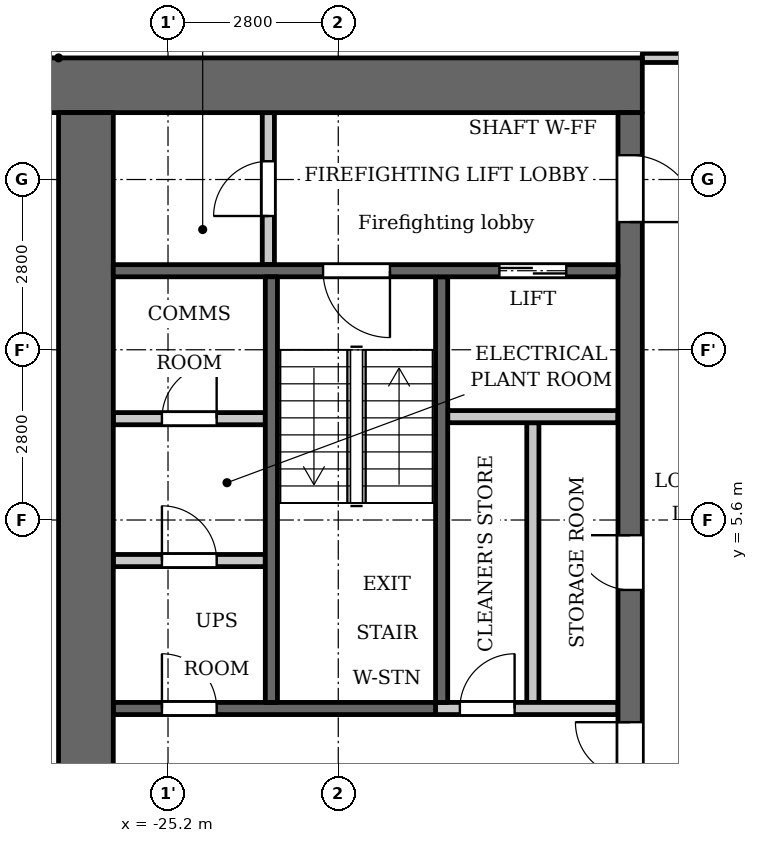
"""IFC4 building model, lengths in metres.
Left out: names, types, materials, properties, quantities, classifications, styles, units other than length and angle.
Written with IfcOpenShell. Run it as: python <this file> out.ifc"""

import sys

from ifc_helpers import new_model, si_unit, direction, frame, frame_2d, origin, place, context, subcontext, project, spatial, rectangle, extrude, element, fill, save


model = new_model("IFC4")
c1 = context("Model", 3, precision=1e-05, world=origin(), true_north=direction((0.0, 1.0)))
c2 = subcontext(c1, "Body", "Model", "MODEL_VIEW")
j1 = project(units=[si_unit("LENGTHUNIT", "METRE"), si_unit("PLANEANGLEUNIT", "RADIAN")], contexts=[c1])
p1 = place(None, origin())
s1 = spatial("IfcSite", under=j1, at=p1, CompositionType="ELEMENT")
p2 = place(p1, origin())
s2 = spatial("IfcBuilding", under=s1, at=p2, CompositionType="ELEMENT")
p3 = place(p2, frame((0.0, 0.0, 44.5)))
s3 = spatial("IfcBuildingStorey", under=s2, at=p3, CompositionType="ELEMENT", Elevation=44.5)
p4 = place(p3, frame((-20.7, 2.6, 0.0), z_axis=(0.0, 0.0, 1.0), x_axis=(0.0, 1.0, 0.0)))
e1 = element("IfcWall", 1, at=p4, inside=s3, PredefinedType="SHEAR", context=c2, shape_type="SweptSolid", body=[
    extrude(rectangle(XDim=7.0, YDim=0.2, at=frame_2d((3.5, 0.0))), origin(), (0.0, 0.0, 1.0), 3.2),
])
p5 = place(p3, frame((-20.8, 2.5, 0.0), z_axis=(0.0, 0.0, 1.0), x_axis=(-1.0, 0.0, 0.0)))
e2 = element("IfcWall", 2, at=p5, inside=s3, PredefinedType="SHEAR", context=c2, shape_type="SweptSolid", body=[
    extrude(rectangle(XDim=5.3, YDim=0.2, at=frame_2d((2.65, 0.0))), origin(), (0.0, 0.0, 1.0), 3.2),
])
p6 = place(p5, frame((3.6, 0.0, 0.0)))
e3 = element("IfcOpeningElement", 3, at=p6, cuts=e2, PredefinedType="OPENING", context=c2, shape_type="SweptSolid", body=[
    extrude(rectangle(XDim=0.9, YDim=2.1, at=frame_2d((0.45, 1.05))), frame((0.0, 0.11, 0.0), z_axis=(0.0, -1.0, 0.0), x_axis=(1.0, 0.0, 0.0)), (0.0, 0.0, 1.0), 0.22),
])
p7 = place(p3, frame((-17.4, 12.75, 0.0), z_axis=(0.0, 0.0, 1.0), x_axis=(-1.0, 0.0, 0.0)))
e4 = element("IfcWall", 4, at=p7, inside=s3, PredefinedType="SHEAR", context=c2, shape_type="SweptSolid", body=[
    extrude(rectangle(XDim=10.4, YDim=0.9, at=frame_2d((5.2, 0.0))), origin(), (0.0, 0.0, 1.0), 3.2),
])
p8 = place(p3, frame((-19.2, 2.6, 0.0), z_axis=(0.0, 0.0, 1.0), x_axis=(0.0, 1.0, 0.0)))
e5 = element("IfcWall", 5, at=p8, inside=s3, PredefinedType="PARTITIONING", context=c2, shape_type="SweptSolid", body=[
    extrude(rectangle(XDim=4.6, YDim=0.2, at=frame_2d((2.3, 0.0))), origin(), (0.0, 0.0, 1.0), 3.2),
])
p9 = place(p3, frame((-17.6, -12.3, 0.0), z_axis=(0.0, 0.0, 1.0), x_axis=(0.0, 1.0, 0.0)))
e6 = element("IfcWall", 6, at=p9, inside=s3, PredefinedType="SHEAR", context=c2, shape_type="SweptSolid", body=[
    extrude(rectangle(XDim=24.6, YDim=0.4, at=frame_2d((12.3, 0.0))), origin(), (0.0, 0.0, 1.0), 3.2),
])
p10 = place(p9, frame((6.0, 0.0, 0.0)))
e7 = element("IfcOpeningElement", 7, at=p10, cuts=e6, PredefinedType="OPENING", context=c2, shape_type="SweptSolid", body=[
    extrude(rectangle(XDim=1.1, YDim=2.1, at=frame_2d((0.55, 1.05))), frame((0.0, 0.21, 0.0), z_axis=(0.0, -1.0, 0.0), x_axis=(1.0, 0.0, 0.0)), (0.0, 0.0, 1.0), 0.42),
])
p11 = place(p9, frame((8.4, 0.0, 0.0)))
e8 = element("IfcOpeningElement", 8, at=p11, cuts=e6, PredefinedType="OPENING", context=c2, shape_type="SweptSolid", body=[
    extrude(rectangle(XDim=1.1, YDim=2.1, at=frame_2d((0.55, 1.05))), frame((0.0, 0.21, 0.0), z_axis=(0.0, -1.0, 0.0), x_axis=(1.0, 0.0, 0.0)), (0.0, 0.0, 1.0), 0.42),
])
p12 = place(p9, frame((10.8, 0.0, 0.0)))
e9 = element("IfcOpeningElement", 9, at=p12, cuts=e6, PredefinedType="OPENING", context=c2, shape_type="SweptSolid", body=[
    extrude(rectangle(XDim=1.1, YDim=2.1, at=frame_2d((0.55, 1.05))), frame((0.0, 0.21, 0.0), z_axis=(0.0, -1.0, 0.0), x_axis=(1.0, 0.0, 0.0)), (0.0, 0.0, 1.0), 0.42),
])
p13 = place(p9, frame((16.75, 0.0, 0.0)))
e10 = element("IfcOpeningElement", 10, at=p13, cuts=e6, PredefinedType="OPENING", context=c2, shape_type="SweptSolid", body=[
    extrude(rectangle(XDim=0.9, YDim=2.1, at=frame_2d((0.45, 1.05))), frame((0.0, 0.21, 0.0), z_axis=(0.0, -1.0, 0.0), x_axis=(1.0, 0.0, 0.0)), (0.0, 0.0, 1.0), 0.42),
])
p14 = place(p9, frame((22.8, 0.0, 0.0)))
e11 = element("IfcOpeningElement", 11, at=p14, cuts=e6, PredefinedType="OPENING", context=c2, shape_type="SweptSolid", body=[
    extrude(rectangle(XDim=1.1, YDim=2.1, at=frame_2d((0.55, 1.05))), frame((0.0, 0.21, 0.0), z_axis=(0.0, -1.0, 0.0), x_axis=(1.0, 0.0, 0.0)), (0.0, 0.0, 1.0), 0.42),
])
p15 = place(p9, frame((0.7, 0.0, 0.0)))
e12 = element("IfcOpeningElement", 12, at=p15, cuts=e6, PredefinedType="OPENING", context=c2, shape_type="SweptSolid", body=[
    extrude(rectangle(XDim=1.1, YDim=2.1, at=frame_2d((0.55, 1.05))), frame((0.0, 0.21, 0.0), z_axis=(0.0, -1.0, 0.0), x_axis=(1.0, 0.0, 0.0)), (0.0, 0.0, 1.0), 0.42),
])
p16 = place(p9, frame((12.775, 0.0, 0.0)))
e13 = element("IfcOpeningElement", 13, at=p16, cuts=e6, PredefinedType="OPENING", context=c2, shape_type="SweptSolid", body=[
    extrude(rectangle(XDim=1.8, YDim=2.1, at=frame_2d((0.9, 1.05))), frame((0.0, 0.21, 0.0), z_axis=(0.0, -1.0, 0.0), x_axis=(1.0, 0.0, 0.0)), (0.0, 0.0, 1.0), 0.42),
])
p17 = place(p3, frame((-26.55, -12.3, 0.0), z_axis=(0.0, 0.0, 1.0), x_axis=(0.0, 1.0, 0.0)))
e14 = element("IfcWall", 14, at=p17, inside=s3, PredefinedType="SHEAR", context=c2, shape_type="SweptSolid", body=[
    extrude(rectangle(XDim=24.6, YDim=0.9, at=frame_2d((12.3, 0.0))), origin(), (0.0, 0.0, 1.0), 3.2),
])
p18 = place(p3, frame((-23.55, 9.8, 0.0), z_axis=(0.0, 0.0, 1.0), x_axis=(0.0, 1.0, 0.0)))
e15 = element("IfcWall", 15, at=p18, inside=s3, PredefinedType="PARTITIONING", context=c2, shape_type="SweptSolid", body=[
    extrude(rectangle(XDim=2.5, YDim=0.2, at=frame_2d((1.25, 0.0))), origin(), (0.0, 0.0, 1.0), 3.2),
])
p19 = place(p18, frame((0.8, 0.0, 0.0)))
e16 = element("IfcOpeningElement", 16, at=p19, cuts=e15, PredefinedType="OPENING", context=c2, shape_type="SweptSolid", body=[
    extrude(rectangle(XDim=0.9, YDim=2.1, at=frame_2d((0.45, 1.05))), frame((0.0, 0.11, 0.0), z_axis=(0.0, -1.0, 0.0), x_axis=(1.0, 0.0, 0.0)), (0.0, 0.0, 1.0), 0.22),
])
p20 = place(p3, frame((-23.6, 4.933, 0.0), z_axis=(0.0, 0.0, 1.0), x_axis=(-1.0, 0.0, 0.0)))
e17 = element("IfcWall", 17, at=p20, inside=s3, PredefinedType="PARTITIONING", context=c2, shape_type="SweptSolid", body=[
    extrude(rectangle(XDim=2.5, YDim=0.2, at=frame_2d((1.25, 0.0))), origin(), (0.0, 0.0, 1.0), 3.2),
])
p21 = place(p20, frame((0.8, 0.0, 0.0)))
e18 = element("IfcOpeningElement", 18, at=p21, cuts=e17, PredefinedType="OPENING", context=c2, shape_type="SweptSolid", body=[
    extrude(rectangle(XDim=0.9, YDim=2.1, at=frame_2d((0.45, 1.05))), frame((0.0, 0.11, 0.0), z_axis=(0.0, -1.0, 0.0), x_axis=(1.0, 0.0, 0.0)), (0.0, 0.0, 1.0), 0.22),
])
p22 = place(p3, frame((-23.6, 7.267, 0.0), z_axis=(0.0, 0.0, 1.0), x_axis=(-1.0, 0.0, 0.0)))
e19 = element("IfcWall", 19, at=p22, inside=s3, PredefinedType="PARTITIONING", context=c2, shape_type="SweptSolid", body=[
    extrude(rectangle(XDim=2.5, YDim=0.2, at=frame_2d((1.25, 0.0))), origin(), (0.0, 0.0, 1.0), 3.2),
])
p23 = place(p22, frame((0.8, 0.0, 0.0)))
e20 = element("IfcOpeningElement", 20, at=p23, cuts=e19, PredefinedType="OPENING", context=c2, shape_type="SweptSolid", body=[
    extrude(rectangle(XDim=0.9, YDim=2.1, at=frame_2d((0.45, 1.05))), frame((0.0, 0.11, 0.0), z_axis=(0.0, -1.0, 0.0), x_axis=(1.0, 0.0, 0.0)), (0.0, 0.0, 1.0), 0.22),
])
p24 = place(p3, frame((-17.8, 2.5, 0.0), z_axis=(0.0, 0.0, 1.0), x_axis=(-1.0, 0.0, 0.0)))
e21 = element("IfcWall", 21, at=p24, inside=s3, PredefinedType="PARTITIONING", context=c2, shape_type="SweptSolid", body=[
    extrude(rectangle(XDim=3.0, YDim=0.2, at=frame_2d((1.5, 0.0))), origin(), (0.0, 0.0, 1.0), 3.2),
])
p25 = place(p24, frame((1.7, 0.0, 0.0)))
e22 = element("IfcOpeningElement", 22, at=p25, cuts=e21, PredefinedType="OPENING", context=c2, shape_type="SweptSolid", body=[
    extrude(rectangle(XDim=0.9, YDim=2.1, at=frame_2d((0.45, 1.05))), frame((0.0, 0.11, 0.0), z_axis=(0.0, -1.0, 0.0), x_axis=(1.0, 0.0, 0.0)), (0.0, 0.0, 1.0), 0.22),
])
p26 = place(p3, frame((-17.8, 7.3, 0.0), z_axis=(0.0, 0.0, 1.0), x_axis=(-1.0, 0.0, 0.0)))
e23 = element("IfcWall", 23, at=p26, inside=s3, PredefinedType="PARTITIONING", context=c2, shape_type="SweptSolid", body=[
    extrude(rectangle(XDim=2.8, YDim=0.2, at=frame_2d((1.4, 0.0))), origin(), (0.0, 0.0, 1.0), 3.2),
])
p27 = place(p3, frame((-17.8, 9.7, 0.0), z_axis=(0.0, 0.0, 1.0), x_axis=(-1.0, 0.0, 0.0)))
e24 = element("IfcWall", 24, at=p27, inside=s3, PredefinedType="SHEAR", context=c2, shape_type="SweptSolid", body=[
    extrude(rectangle(XDim=8.3, YDim=0.2, at=frame_2d((4.15, 0.0))), origin(), (0.0, 0.0, 1.0), 3.2),
])
p28 = place(p27, frame((0.85, 0.0, 0.0)))
e25 = element("IfcOpeningElement", 25, at=p28, cuts=e24, PredefinedType="OPENING", context=c2, shape_type="SweptSolid", body=[
    extrude(rectangle(XDim=1.1, YDim=2.1, at=frame_2d((0.55, 1.05))), frame((0.0, 0.11, 0.0), z_axis=(0.0, -1.0, 0.0), x_axis=(1.0, 0.0, 0.0)), (0.0, 0.0, 1.0), 0.22),
])
p29 = place(p27, frame((3.75, 0.0, 0.0)))
e26 = element("IfcOpeningElement", 26, at=p29, cuts=e24, PredefinedType="OPENING", context=c2, shape_type="SweptSolid", body=[
    extrude(rectangle(XDim=1.1, YDim=2.1, at=frame_2d((0.55, 1.05))), frame((0.0, 0.11, 0.0), z_axis=(0.0, -1.0, 0.0), x_axis=(1.0, 0.0, 0.0)), (0.0, 0.0, 1.0), 0.22),
])
p30 = place(p3, frame((-23.5, 2.6, 0.0), z_axis=(0.0, 0.0, 1.0), x_axis=(0.0, 1.0, 0.0)))
e27 = element("IfcWall", 27, at=p30, inside=s3, PredefinedType="SHEAR", context=c2, shape_type="SweptSolid", body=[
    extrude(rectangle(XDim=7.0, YDim=0.2, at=frame_2d((3.5, 0.0))), origin(), (0.0, 0.0, 1.0), 3.2),
])
p31 = place(p3, frame((-17.4, 13.2, 0.0), z_axis=(0.0, 0.0, 1.0), x_axis=(1.0, 0.0, 0.0)))
e28 = element("IfcWall", 28, at=p31, inside=s3, PredefinedType="PARTITIONING", context=c2, shape_type="SweptSolid", body=[
    extrude(rectangle(XDim=34.8, YDim=0.15, at=frame_2d((17.4, 0.0))), origin(), (0.0, 0.0, 1.0), 3.2),
])
p32 = place(p31, frame((0.75, 0.0, 0.0)))
e29 = element("IfcOpeningElement", 29, at=p32, cuts=e28, PredefinedType="OPENING", context=c2, shape_type="SweptSolid", body=[
    extrude(rectangle(XDim=1.0, YDim=2.1, at=frame_2d((0.5, 1.05))), frame((0.0, 0.085, 0.0), z_axis=(0.0, -1.0, 0.0), x_axis=(1.0, 0.0, 0.0)), (0.0, 0.0, 1.0), 0.17),
])
p33 = place(p31, frame((33.15, 0.0, 0.0)))
e30 = element("IfcOpeningElement", 30, at=p33, cuts=e28, PredefinedType="OPENING", context=c2, shape_type="SweptSolid", body=[
    extrude(rectangle(XDim=1.0, YDim=2.1, at=frame_2d((0.5, 1.05))), frame((0.0, 0.085, 0.0), z_axis=(0.0, -1.0, 0.0), x_axis=(1.0, 0.0, 0.0)), (0.0, 0.0, 1.0), 0.17),
])
p34 = place(p31, frame((3.05, 0.0, 0.0)))
e31 = element("IfcOpeningElement", 31, at=p34, cuts=e28, PredefinedType="OPENING", context=c2, shape_type="SweptSolid", body=[
    extrude(rectangle(XDim=1.0, YDim=2.1, at=frame_2d((0.5, 1.05))), frame((0.0, 0.085, 0.0), z_axis=(0.0, -1.0, 0.0), x_axis=(1.0, 0.0, 0.0)), (0.0, 0.0, 1.0), 0.17),
])
p35 = place(p31, frame((12.45, 0.0, 0.0)))
e32 = element("IfcOpeningElement", 32, at=p35, cuts=e28, PredefinedType="OPENING", context=c2, shape_type="SweptSolid", body=[
    extrude(rectangle(XDim=1.0, YDim=2.1, at=frame_2d((0.5, 1.05))), frame((0.0, 0.085, 0.0), z_axis=(0.0, -1.0, 0.0), x_axis=(1.0, 0.0, 0.0)), (0.0, 0.0, 1.0), 0.17),
])
p36 = place(p31, frame((18.3, 0.0, 0.0)))
e33 = element("IfcOpeningElement", 33, at=p36, cuts=e28, PredefinedType="OPENING", context=c2, shape_type="SweptSolid", body=[
    extrude(rectangle(XDim=1.0, YDim=2.1, at=frame_2d((0.5, 1.05))), frame((0.0, 0.085, 0.0), z_axis=(0.0, -1.0, 0.0), x_axis=(1.0, 0.0, 0.0)), (0.0, 0.0, 1.0), 0.17),
])
p37 = place(p31, frame((29.25, 0.0, 0.0)))
e34 = element("IfcOpeningElement", 34, at=p37, cuts=e28, PredefinedType="OPENING", context=c2, shape_type="SweptSolid", body=[
    extrude(rectangle(XDim=1.0, YDim=2.1, at=frame_2d((0.5, 1.05))), frame((0.0, 0.085, 0.0), z_axis=(0.0, -1.0, 0.0), x_axis=(1.0, 0.0, 0.0)), (0.0, 0.0, 1.0), 0.17),
])
p38 = place(p13, origin())
e35 = element("IfcDoor", 35, at=p38, inside=s3, OperationType="SINGLE_SWING_LEFT", PredefinedType="DOOR", context=c2, shape_type="SweptSolid", body=[
    extrude(rectangle(XDim=0.9, YDim=2.1, at=frame_2d((0.45, 1.05))), frame((0.0, 0.025, 0.0), z_axis=(0.0, -1.0, 0.0), x_axis=(1.0, 0.0, 0.0)), (0.0, 0.0, 1.0), 0.05),
])
fill(e10, e35)
p39 = place(p25, origin())
e36 = element("IfcDoor", 36, at=p39, inside=s3, OperationType="SINGLE_SWING_LEFT", PredefinedType="DOOR", context=c2, shape_type="SweptSolid", body=[
    extrude(rectangle(XDim=0.9, YDim=2.1, at=frame_2d((0.45, 1.05))), frame((0.0, 0.025, 0.0), z_axis=(0.0, -1.0, 0.0), x_axis=(1.0, 0.0, 0.0)), (0.0, 0.0, 1.0), 0.05),
])
fill(e22, e36)
p40 = place(p28, origin())
e37 = element("IfcDoor", 37, at=p40, inside=s3, OperationType="DOUBLE_DOOR_SLIDING", PredefinedType="DOOR", context=c2, shape_type="SweptSolid", body=[
    extrude(rectangle(XDim=1.1, YDim=2.1, at=frame_2d((0.55, 1.05))), frame((0.0, 0.025, 0.0), z_axis=(0.0, -1.0, 0.0), x_axis=(1.0, 0.0, 0.0)), (0.0, 0.0, 1.0), 0.05),
])
fill(e25, e37)
p41 = place(p14, origin())
e38 = element("IfcDoor", 38, at=p41, inside=s3, OperationType="SINGLE_SWING_LEFT", PredefinedType="DOOR", context=c2, shape_type="SweptSolid", body=[
    extrude(rectangle(XDim=1.1, YDim=2.1, at=frame_2d((0.55, 1.05))), frame((0.0, 0.025, 0.0), z_axis=(0.0, -1.0, 0.0), x_axis=(1.0, 0.0, 0.0)), (0.0, 0.0, 1.0), 0.05),
])
fill(e11, e38)
p42 = place(p19, origin())
e39 = element("IfcDoor", 39, at=p42, inside=s3, OperationType="SINGLE_SWING_RIGHT", PredefinedType="DOOR", context=c2, shape_type="SweptSolid", body=[
    extrude(rectangle(XDim=0.9, YDim=2.1, at=frame_2d((0.45, 1.05))), frame((0.0, 0.025, 0.0), z_axis=(0.0, -1.0, 0.0), x_axis=(1.0, 0.0, 0.0)), (0.0, 0.0, 1.0), 0.05),
])
fill(e16, e39)
p43 = place(p29, origin())
e40 = element("IfcDoor", 40, at=p43, inside=s3, OperationType="SINGLE_SWING_RIGHT", PredefinedType="DOOR", context=c2, shape_type="SweptSolid", body=[
    extrude(rectangle(XDim=1.1, YDim=2.1, at=frame_2d((0.55, 1.05))), frame((0.0, 0.025, 0.0), z_axis=(0.0, -1.0, 0.0), x_axis=(1.0, 0.0, 0.0)), (0.0, 0.0, 1.0), 0.05),
])
fill(e26, e40)
p44 = place(p16, origin())
e41 = element("IfcDoor", 41, at=p44, inside=s3, OperationType="DOUBLE_DOOR_SINGLE_SWING", PredefinedType="DOOR", context=c2, shape_type="SweptSolid", body=[
    extrude(rectangle(XDim=1.8, YDim=2.1, at=frame_2d((0.9, 1.05))), frame((0.0, 0.025, 0.0), z_axis=(0.0, -1.0, 0.0), x_axis=(1.0, 0.0, 0.0)), (0.0, 0.0, 1.0), 0.05),
])
fill(e13, e41)
p45 = place(p21, origin())
e42 = element("IfcDoor", 42, at=p45, inside=s3, OperationType="SINGLE_SWING_RIGHT", PredefinedType="DOOR", context=c2, shape_type="SweptSolid", body=[
    extrude(rectangle(XDim=0.9, YDim=2.1, at=frame_2d((0.45, 1.05))), frame((0.0, 0.025, 0.0), z_axis=(0.0, -1.0, 0.0), x_axis=(1.0, 0.0, 0.0)), (0.0, 0.0, 1.0), 0.05),
])
fill(e18, e42)
p46 = place(p23, origin())
e43 = element("IfcDoor", 43, at=p46, inside=s3, OperationType="SINGLE_SWING_LEFT", PredefinedType="DOOR", context=c2, shape_type="SweptSolid", body=[
    extrude(rectangle(XDim=0.9, YDim=2.1, at=frame_2d((0.45, 1.05))), frame((0.0, 0.025, 0.0), z_axis=(0.0, -1.0, 0.0), x_axis=(1.0, 0.0, 0.0)), (0.0, 0.0, 1.0), 0.05),
])
fill(e20, e43)
p47 = place(p6, origin())
e44 = element("IfcDoor", 44, at=p47, inside=s3, OperationType="SINGLE_SWING_RIGHT", PredefinedType="DOOR", context=c2, shape_type="SweptSolid", body=[
    extrude(rectangle(XDim=0.9, YDim=2.1, at=frame_2d((0.45, 1.05))), frame((0.0, 0.025, 0.0), z_axis=(0.0, -1.0, 0.0), x_axis=(1.0, 0.0, 0.0)), (0.0, 0.0, 1.0), 0.05),
])
fill(e3, e44)
save(model, sys.argv[1])
